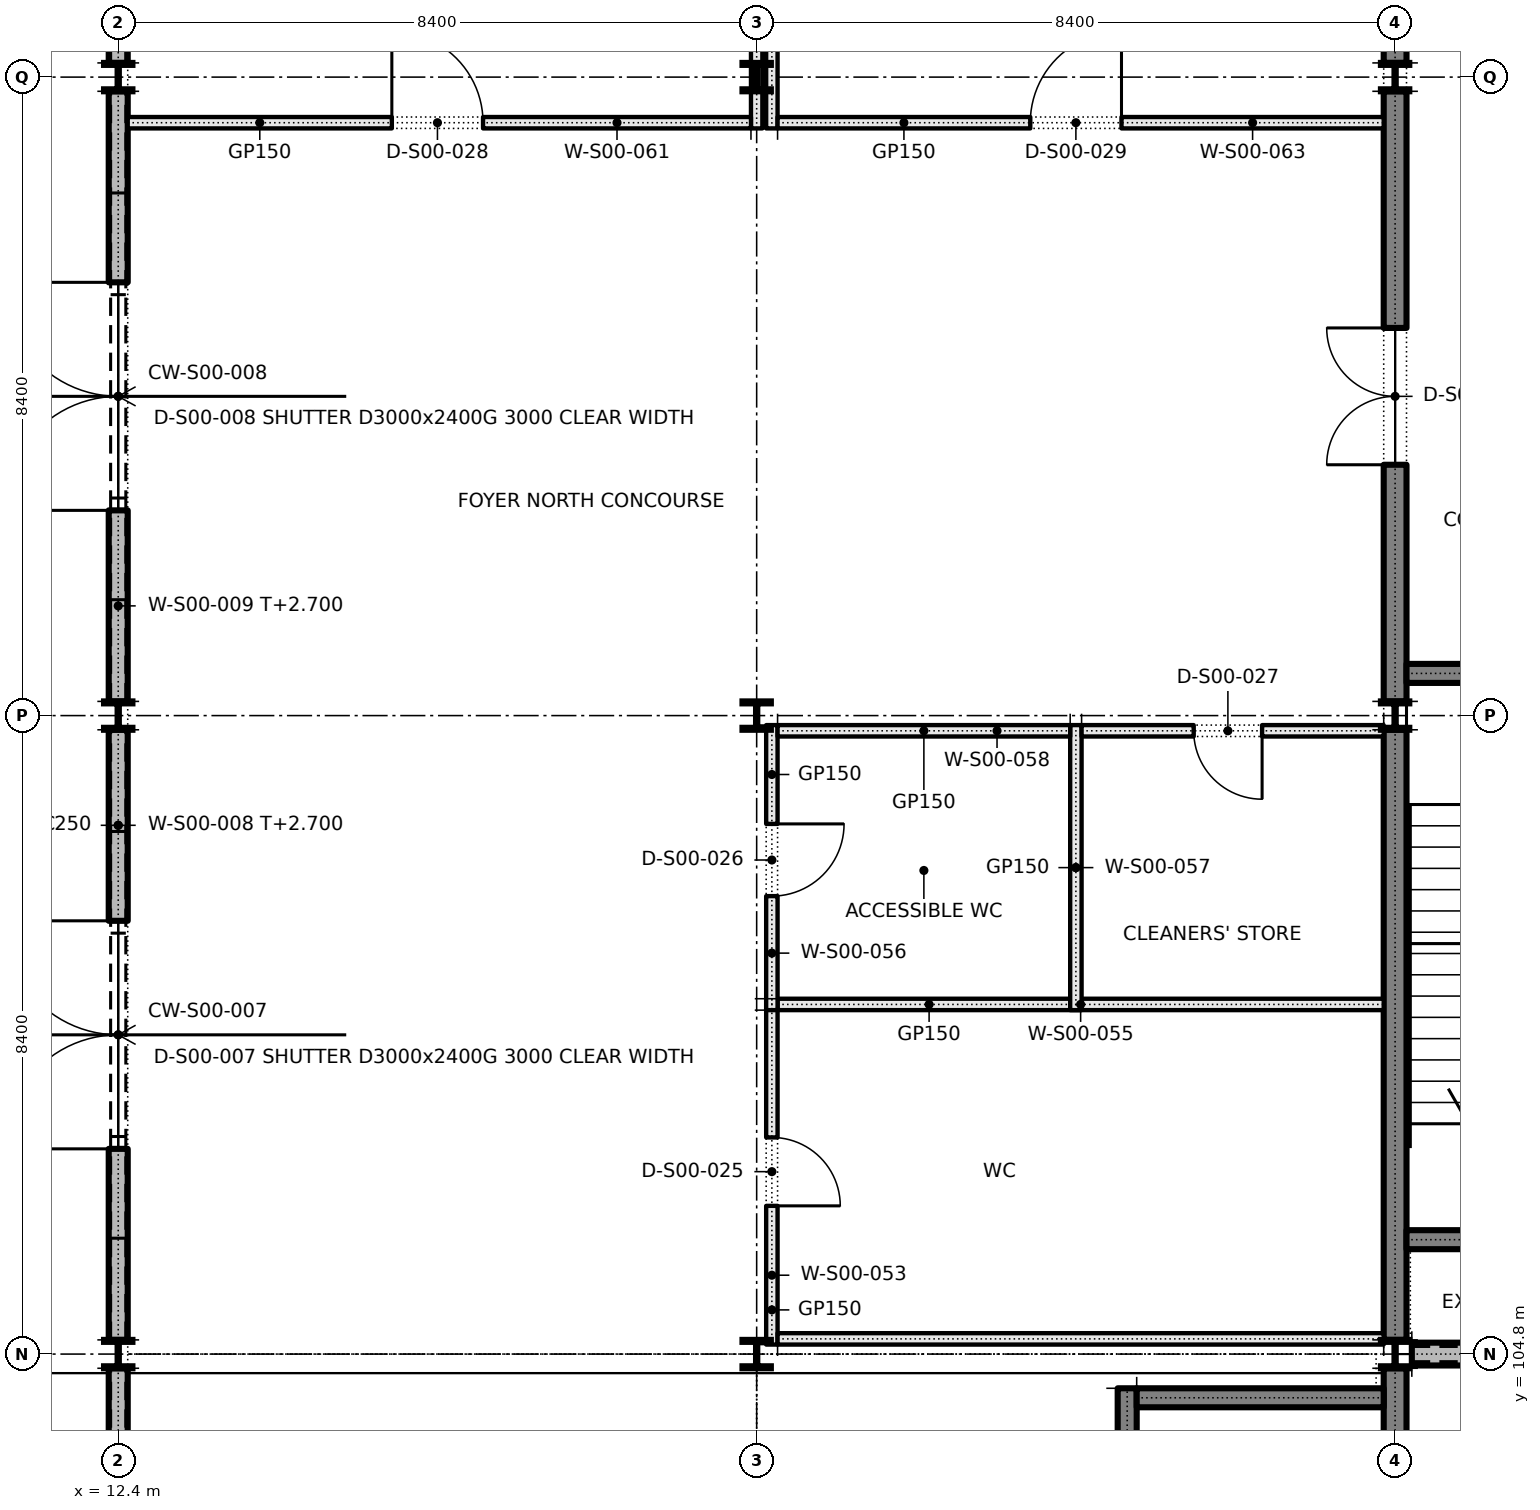
"""IFC4 building model, lengths in metres.
Left out: names, types, materials, properties, quantities, classifications, styles, units other than length and angle.
Written with IfcOpenShell. Run it as: python <this file> out.ifc"""

import sys

from ifc_helpers import new_model, si_unit, direction, frame, frame_2d, origin, origin_2d, place, context, subcontext, project, spatial, rectangle, i_section, extrude, element, fill, save


model = new_model("IFC4")
c1 = context("Model", 3, precision=1e-05, world=origin(), true_north=direction((0.0, 1.0)))
c2 = subcontext(c1, "Body", "Model", "MODEL_VIEW")
j1 = project(units=[si_unit("LENGTHUNIT", "METRE"), si_unit("PLANEANGLEUNIT", "RADIAN")], contexts=[c1])
p1 = place(None, origin())
s1 = spatial("IfcSite", under=j1, at=p1, CompositionType="ELEMENT")
p2 = place(p1, origin())
s2 = spatial("IfcBuilding", under=s1, at=p2, CompositionType="ELEMENT")
p3 = place(p2, origin())
s3 = spatial("IfcBuildingStorey", under=s2, at=p3, CompositionType="ELEMENT", Elevation=0.0)
for number, where, z_axis, x_axis in (
    (1, (12.4, 104.8, 0.0), (0.0, 0.0, 1.0), (1.0, 0.0, 0.0)),
    (2, (12.4, 113.2, 0.0), (0.0, 0.0, 1.0), (1.0, 0.0, 0.0)),
    (3, (12.4, 121.6, 0.0), (0.0, 0.0, 1.0), (1.0, 0.0, 0.0)),
    (4, (20.8, 104.8, 0.0), (0.0, 0.0, 1.0), (1.0, 0.0, 0.0)),
    (5, (20.8, 113.2, 0.0), (0.0, 0.0, 1.0), (1.0, 0.0, 0.0)),
    (6, (20.8, 121.6, 0.0), (0.0, 0.0, 1.0), (1.0, 0.0, 0.0)),
    (7, (29.2, 104.8, 0.0), (0.0, 0.0, 1.0), (1.0, 0.0, 0.0)),
    (8, (29.2, 113.2, 0.0), (0.0, 0.0, 1.0), (1.0, 0.0, 0.0)),
    (9, (29.2, 121.6, 0.0), (0.0, 0.0, 1.0), (1.0, 0.0, 0.0)),
):
    element("IfcColumn", number, at=place(p3, frame(where, z_axis=z_axis, x_axis=x_axis)), inside=s3, PredefinedType="COLUMN", context=c2, shape_type="SweptSolid", body=[
        extrude(i_section(OverallWidth=0.373, OverallDepth=0.373, WebThickness=0.016, FlangeThickness=0.026, FilletRadius=0.015, at=origin_2d()), origin(), (0.0, 0.0, 1.0), 5.4),
    ])
p4 = place(p3, frame((12.4, 96.587, 0.0), z_axis=(0.0, 0.0, 1.0), x_axis=(0.0, 1.0, 0.0)))
e10 = element("IfcWall", 10, at=p4, inside=s3, PredefinedType="SOLIDWALL", context=c2, shape_type="SweptSolid", body=[
    extrude(rectangle(XDim=8.027, YDim=0.25, at=frame_2d((4.013, 0.0))), origin(), (0.0, 0.0, 1.0), 2.7),
])
p5 = place(p4, frame((2.513, 0.0, 0.0)))
e11 = element("IfcOpeningElement", 11, at=p5, cuts=e10, PredefinedType="OPENING", context=c2, shape_type="SweptSolid", body=[
    extrude(rectangle(XDim=3.0, YDim=2.4, at=frame_2d((1.5, 1.2))), frame((0.0, 0.135, 0.0), z_axis=(0.0, -1.0, 0.0), x_axis=(1.0, 0.0, 0.0)), (0.0, 0.0, 1.0), 0.27),
])
p6 = place(p3, frame((12.4, 104.987, 0.0), z_axis=(0.0, 0.0, 1.0), x_axis=(0.0, 1.0, 0.0)))
e12 = element("IfcWall", 12, at=p6, inside=s3, PredefinedType="SOLIDWALL", context=c2, shape_type="SweptSolid", body=[
    extrude(rectangle(XDim=8.027, YDim=0.25, at=frame_2d((4.013, 0.0))), origin(), (0.0, 0.0, 1.0), 2.7),
])
p7 = place(p6, frame((2.513, 0.0, 0.0)))
e13 = element("IfcOpeningElement", 13, at=p7, cuts=e12, PredefinedType="OPENING", context=c2, shape_type="SweptSolid", body=[
    extrude(rectangle(XDim=3.0, YDim=2.4, at=frame_2d((1.5, 1.2))), frame((0.0, 0.135, 0.0), z_axis=(0.0, -1.0, 0.0), x_axis=(1.0, 0.0, 0.0)), (0.0, 0.0, 1.0), 0.27),
])
p8 = place(p3, frame((12.4, 113.387, 0.0), z_axis=(0.0, 0.0, 1.0), x_axis=(0.0, 1.0, 0.0)))
e14 = element("IfcWall", 14, at=p8, inside=s3, PredefinedType="SOLIDWALL", context=c2, shape_type="SweptSolid", body=[
    extrude(rectangle(XDim=8.027, YDim=0.25, at=frame_2d((4.013, 0.0))), origin(), (0.0, 0.0, 1.0), 2.7),
])
p9 = place(p8, frame((2.513, 0.0, 0.0)))
e15 = element("IfcOpeningElement", 15, at=p9, cuts=e14, PredefinedType="OPENING", context=c2, shape_type="SweptSolid", body=[
    extrude(rectangle(XDim=3.0, YDim=2.4, at=frame_2d((1.5, 1.2))), frame((0.0, 0.135, 0.0), z_axis=(0.0, -1.0, 0.0), x_axis=(1.0, 0.0, 0.0)), (0.0, 0.0, 1.0), 0.27),
])
p10 = place(p3, frame((12.4, 121.787, 0.0), z_axis=(0.0, 0.0, 1.0), x_axis=(0.0, 1.0, 0.0)))
e16 = element("IfcWall", 16, at=p10, inside=s3, PredefinedType="SOLIDWALL", context=c2, shape_type="SweptSolid", body=[
    extrude(rectangle(XDim=8.027, YDim=0.25, at=frame_2d((4.013, 0.0))), origin(), (0.0, 0.0, 1.0), 2.7),
])
p11 = place(p10, frame((2.513, 0.0, 0.0)))
e17 = element("IfcOpeningElement", 17, at=p11, cuts=e16, PredefinedType="OPENING", context=c2, shape_type="SweptSolid", body=[
    extrude(rectangle(XDim=3.0, YDim=2.4, at=frame_2d((1.5, 1.2))), frame((0.0, 0.135, 0.0), z_axis=(0.0, -1.0, 0.0), x_axis=(1.0, 0.0, 0.0)), (0.0, 0.0, 1.0), 0.27),
])
p12 = place(p3, frame((29.2, 96.65, 0.0), z_axis=(0.0, 0.0, 1.0), x_axis=(0.0, 1.0, 0.0)))
e18 = element("IfcWall", 18, at=p12, inside=s3, PredefinedType="SOLIDWALL", context=c2, shape_type="SweptSolid", body=[
    extrude(rectangle(XDim=7.963, YDim=0.3, at=frame_2d((3.982, 0.0))), origin(), (0.0, 0.0, 1.0), 5.4),
])
p13 = place(p12, frame((0.55, 0.0, 0.0)))
e19 = element("IfcOpeningElement", 19, at=p13, cuts=e18, PredefinedType="OPENING", context=c2, shape_type="SweptSolid", body=[
    extrude(rectangle(XDim=1.1, YDim=2.1, at=frame_2d((0.55, 1.05))), frame((0.0, 0.16, 0.0), z_axis=(0.0, -1.0, 0.0), x_axis=(1.0, 0.0, 0.0)), (0.0, 0.0, 1.0), 0.32),
])
p14 = place(p3, frame((29.2, 104.987, 0.0), z_axis=(0.0, 0.0, 1.0), x_axis=(0.0, 1.0, 0.0)))
e20 = element("IfcWall", 20, at=p14, inside=s3, PredefinedType="SOLIDWALL", context=c2, shape_type="SweptSolid", body=[
    extrude(rectangle(XDim=8.027, YDim=0.3, at=frame_2d((4.013, 0.0))), origin(), (0.0, 0.0, 1.0), 5.4),
])
p15 = place(p3, frame((29.2, 113.387, 0.0), z_axis=(0.0, 0.0, 1.0), x_axis=(0.0, 1.0, 0.0)))
e21 = element("IfcWall", 21, at=p15, inside=s3, PredefinedType="SOLIDWALL", context=c2, shape_type="SweptSolid", body=[
    extrude(rectangle(XDim=8.027, YDim=0.3, at=frame_2d((4.013, 0.0))), origin(), (0.0, 0.0, 1.0), 5.4),
])
p16 = place(p15, frame((3.113, 0.0, 0.0)))
e22 = element("IfcOpeningElement", 22, at=p16, cuts=e21, PredefinedType="OPENING", context=c2, shape_type="SweptSolid", body=[
    extrude(rectangle(XDim=1.8, YDim=2.4, at=frame_2d((0.9, 1.2))), frame((0.0, 0.16, 0.0), z_axis=(0.0, -1.0, 0.0), x_axis=(1.0, 0.0, 0.0)), (0.0, 0.0, 1.0), 0.32),
])
p17 = place(p3, frame((29.2, 121.787, 0.0), z_axis=(0.0, 0.0, 1.0), x_axis=(0.0, 1.0, 0.0)))
e23 = element("IfcWall", 23, at=p17, inside=s3, PredefinedType="SOLIDWALL", context=c2, shape_type="SweptSolid", body=[
    extrude(rectangle(XDim=8.027, YDim=0.3, at=frame_2d((4.013, 0.0))), origin(), (0.0, 0.0, 1.0), 5.4),
])
p18 = place(p3, frame((29.42, 104.8, 0.0), z_axis=(0.0, 0.0, 1.0), x_axis=(1.0, 0.0, 0.0)))
e24 = element("IfcWall", 24, at=p18, inside=s3, PredefinedType="SOLIDWALL", context=c2, shape_type="SweptSolid", body=[
    extrude(rectangle(XDim=3.98, YDim=0.3, at=frame_2d((1.99, 0.0))), origin(), (0.0, 0.0, 1.0), 2.7),
])
p19 = place(p18, frame((0.89, 0.0, 0.0)))
e25 = element("IfcOpeningElement", 25, at=p19, cuts=e24, PredefinedType="OPENING", context=c2, shape_type="SweptSolid", body=[
    extrude(rectangle(XDim=2.2, YDim=2.4, at=frame_2d((1.1, 1.2))), frame((0.0, 0.16, 0.0), z_axis=(0.0, -1.0, 0.0), x_axis=(1.0, 0.0, 0.0)), (0.0, 0.0, 1.0), 0.32),
])
p20 = place(p3, frame((25.675, 96.65, 0.0), z_axis=(0.0, 0.0, 1.0), x_axis=(0.0, 1.0, 0.0)))
e26 = element("IfcWall", 26, at=p20, inside=s3, PredefinedType="SHEAR", context=c2, shape_type="SweptSolid", body=[
    extrude(rectangle(XDim=7.7, YDim=0.25, at=frame_2d((3.85, 0.0))), origin(), (0.0, 0.0, 1.0), 5.4),
])
p21 = place(p20, frame((0.4, 0.0, 0.0)))
e27 = element("IfcOpeningElement", 27, at=p21, cuts=e26, PredefinedType="OPENING", context=c2, shape_type="SweptSolid", body=[
    extrude(rectangle(XDim=1.1, YDim=2.1, at=frame_2d((0.55, 1.05))), frame((0.0, 0.135, 0.0), z_axis=(0.0, -1.0, 0.0), x_axis=(1.0, 0.0, 0.0)), (0.0, 0.0, 1.0), 0.27),
])
p22 = place(p3, frame((25.8, 104.225, 0.0), z_axis=(0.0, 0.0, 1.0), x_axis=(1.0, 0.0, 0.0)))
e28 = element("IfcWall", 28, at=p22, inside=s3, PredefinedType="SHEAR", context=c2, shape_type="SweptSolid", body=[
    extrude(rectangle(XDim=3.25, YDim=0.25, at=frame_2d((1.625, 0.0))), origin(), (0.0, 0.0, 1.0), 5.4),
])
p23 = place(p3, frame((21.0, 104.925, 0.0), z_axis=(0.0, 0.0, 1.0), x_axis=(0.0, 1.0, 0.0)))
e29 = element("IfcWall", 29, at=p23, inside=s3, PredefinedType="PARTITIONING", context=c2, shape_type="SweptSolid", body=[
    extrude(rectangle(XDim=4.55, YDim=0.15, at=frame_2d((2.275, 0.0))), origin(), (0.0, 0.0, 1.0), 5.4),
])
p24 = place(p23, frame((1.825, 0.0, 0.0)))
e30 = element("IfcOpeningElement", 30, at=p24, cuts=e29, PredefinedType="OPENING", context=c2, shape_type="SweptSolid", body=[
    extrude(rectangle(XDim=0.9, YDim=2.1, at=frame_2d((0.45, 1.05))), frame((0.0, 0.085, 0.0), z_axis=(0.0, -1.0, 0.0), x_axis=(1.0, 0.0, 0.0)), (0.0, 0.0, 1.0), 0.17),
])
for number, where, z_axis, x_axis in (
    (31, (21.075, 105.0, 0.0), (0.0, 0.0, 1.0), (1.0, 0.0, 0.0)),
    (32, (21.075, 109.4, 0.0), (0.0, 0.0, 1.0), (1.0, 0.0, 0.0)),
):
    element("IfcWall", number, at=place(p3, frame(where, z_axis=z_axis, x_axis=x_axis)), inside=s3, PredefinedType="PARTITIONING", context=c2, shape_type="SweptSolid", body=[
        extrude(rectangle(XDim=7.975, YDim=0.15, at=frame_2d((3.988, 0.0))), origin(), (0.0, 0.0, 1.0), 5.4),
    ])
p25 = place(p3, frame((21.0, 109.325, 0.0), z_axis=(0.0, 0.0, 1.0), x_axis=(0.0, 1.0, 0.0)))
e33 = element("IfcWall", 33, at=p25, inside=s3, PredefinedType="PARTITIONING", context=c2, shape_type="SweptSolid", body=[
    extrude(rectangle(XDim=3.75, YDim=0.15, at=frame_2d((1.875, 0.0))), origin(), (0.0, 0.0, 1.0), 5.4),
])
p26 = place(p25, frame((1.5, 0.0, 0.0)))
e34 = element("IfcOpeningElement", 34, at=p26, cuts=e33, PredefinedType="OPENING", context=c2, shape_type="SweptSolid", body=[
    extrude(rectangle(XDim=0.95, YDim=2.1, at=frame_2d((0.475, 1.05))), frame((0.0, 0.085, 0.0), z_axis=(0.0, -1.0, 0.0), x_axis=(1.0, 0.0, 0.0)), (0.0, 0.0, 1.0), 0.17),
])
p27 = place(p3, frame((25.0, 109.325, 0.0), z_axis=(0.0, 0.0, 1.0), x_axis=(0.0, 1.0, 0.0)))
e35 = element("IfcWall", 35, at=p27, inside=s3, PredefinedType="PARTITIONING", context=c2, shape_type="SweptSolid", body=[
    extrude(rectangle(XDim=3.75, YDim=0.15, at=frame_2d((1.875, 0.0))), origin(), (0.0, 0.0, 1.0), 5.4),
])
p28 = place(p3, frame((21.075, 113.0, 0.0), z_axis=(0.0, 0.0, 1.0), x_axis=(1.0, 0.0, 0.0)))
e36 = element("IfcWall", 36, at=p28, inside=s3, PredefinedType="PARTITIONING", context=c2, shape_type="SweptSolid", body=[
    extrude(rectangle(XDim=3.85, YDim=0.15, at=frame_2d((1.925, 0.0))), origin(), (0.0, 0.0, 1.0), 5.4),
])
p29 = place(p3, frame((25.075, 113.0, 0.0), z_axis=(0.0, 0.0, 1.0), x_axis=(1.0, 0.0, 0.0)))
e37 = element("IfcWall", 37, at=p29, inside=s3, PredefinedType="PARTITIONING", context=c2, shape_type="SweptSolid", body=[
    extrude(rectangle(XDim=3.975, YDim=0.15, at=frame_2d((1.988, 0.0))), origin(), (0.0, 0.0, 1.0), 5.4),
])
p30 = place(p29, frame((1.475, 0.0, 0.0)))
e38 = element("IfcOpeningElement", 38, at=p30, cuts=e37, PredefinedType="OPENING", context=c2, shape_type="SweptSolid", body=[
    extrude(rectangle(XDim=0.9, YDim=2.1, at=frame_2d((0.45, 1.05))), frame((0.0, 0.085, 0.0), z_axis=(0.0, -1.0, 0.0), x_axis=(1.0, 0.0, 0.0)), (0.0, 0.0, 1.0), 0.17),
])
p31 = place(p3, frame((20.8, 120.925, 0.0), z_axis=(0.0, 0.0, 1.0), x_axis=(0.0, 1.0, 0.0)))
e39 = element("IfcWall", 39, at=p31, inside=s3, PredefinedType="PARTITIONING", context=c2, shape_type="SweptSolid", body=[
    extrude(rectangle(XDim=8.95, YDim=0.15, at=frame_2d((4.475, 0.0))), origin(), (0.0, 0.0, 1.0), 4.687),
])
p32 = place(p3, frame((12.525, 121.0, 0.0), z_axis=(0.0, 0.0, 1.0), x_axis=(1.0, 0.0, 0.0)))
e40 = element("IfcWall", 40, at=p32, inside=s3, PredefinedType="PARTITIONING", context=c2, shape_type="SweptSolid", body=[
    extrude(rectangle(XDim=8.2, YDim=0.15, at=frame_2d((4.1, 0.0))), origin(), (0.0, 0.0, 1.0), 5.4),
])
p33 = place(p32, frame((3.475, 0.0, 0.0)))
e41 = element("IfcOpeningElement", 41, at=p33, cuts=e40, PredefinedType="OPENING", context=c2, shape_type="SweptSolid", body=[
    extrude(rectangle(XDim=1.2, YDim=2.1, at=frame_2d((0.6, 1.05))), frame((0.0, 0.085, 0.0), z_axis=(0.0, -1.0, 0.0), x_axis=(1.0, 0.0, 0.0)), (0.0, 0.0, 1.0), 0.17),
])
p34 = place(p3, frame((21.0, 120.925, 0.0), z_axis=(0.0, 0.0, 1.0), x_axis=(0.0, 1.0, 0.0)))
e42 = element("IfcWall", 42, at=p34, inside=s3, PredefinedType="PARTITIONING", context=c2, shape_type="SweptSolid", body=[
    extrude(rectangle(XDim=8.95, YDim=0.15, at=frame_2d((4.475, 0.0))), origin(), (0.0, 0.0, 1.0), 5.4),
])
p35 = place(p3, frame((21.075, 121.0, 0.0), z_axis=(0.0, 0.0, 1.0), x_axis=(1.0, 0.0, 0.0)))
e43 = element("IfcWall", 43, at=p35, inside=s3, PredefinedType="PARTITIONING", context=c2, shape_type="SweptSolid", body=[
    extrude(rectangle(XDim=7.975, YDim=0.15, at=frame_2d((3.988, 0.0))), origin(), (0.0, 0.0, 1.0), 5.4),
])
p36 = place(p35, frame((3.325, 0.0, 0.0)))
e44 = element("IfcOpeningElement", 44, at=p36, cuts=e43, PredefinedType="OPENING", context=c2, shape_type="SweptSolid", body=[
    extrude(rectangle(XDim=1.2, YDim=2.1, at=frame_2d((0.6, 1.05))), frame((0.0, 0.085, 0.0), z_axis=(0.0, -1.0, 0.0), x_axis=(1.0, 0.0, 0.0)), (0.0, 0.0, 1.0), 0.17),
])
p37 = place(p3, frame((29.35, 113.755, 0.0), z_axis=(0.0, 0.0, 1.0), x_axis=(1.0, 0.0, 0.0)))
e45 = element("IfcWall", 45, at=p37, inside=s3, PredefinedType="SHEAR", context=c2, shape_type="SweptSolid", body=[
    extrude(rectangle(XDim=3.25, YDim=0.25, at=frame_2d((1.625, 0.0))), origin(), (0.0, 0.0, 1.0), 5.4),
])
p38 = place(p3, frame((29.35, 106.305, 0.0), z_axis=(0.0, 0.0, 1.0), x_axis=(1.0, 0.0, 0.0)))
e46 = element("IfcWall", 46, at=p38, inside=s3, PredefinedType="SHEAR", context=c2, shape_type="SweptSolid", body=[
    extrude(rectangle(XDim=3.25, YDim=0.25, at=frame_2d((1.625, 0.0))), origin(), (0.0, 0.0, 1.0), 5.4),
])
p39 = place(p38, frame((0.9, 0.0, 0.0)))
e47 = element("IfcOpeningElement", 47, at=p39, cuts=e46, PredefinedType="OPENING", context=c2, shape_type="SweptSolid", body=[
    extrude(rectangle(XDim=1.1, YDim=2.1, at=frame_2d((0.55, 1.05))), frame((0.0, 0.135, 0.0), z_axis=(0.0, -1.0, 0.0), x_axis=(1.0, 0.0, 0.0)), (0.0, 0.0, 1.0), 0.27),
])
p40 = place(p3, frame((29.2, 98.32, -0.2), z_axis=(0.0, 0.0, 1.0), x_axis=(0.0, 1.0, 0.0)))
e48 = element("IfcWall", 48, at=p40, inside=s3, PredefinedType="SOLIDWALL", context=c2, shape_type="SweptSolid", body=[
    extrude(rectangle(XDim=6.16, YDim=0.3, at=frame_2d((3.08, 0.0))), origin(), (0.0, 0.0, 1.0), 0.2),
])
p41 = place(p7, origin())
e49 = element("IfcDoor", 49, at=p41, inside=s3, OperationType="DOUBLE_DOOR_SINGLE_SWING", PredefinedType="DOOR", context=c2, shape_type="SweptSolid", body=[
    extrude(rectangle(XDim=3.0, YDim=2.4, at=frame_2d((1.5, 1.2))), frame((0.0, 0.025, 0.0), z_axis=(0.0, -1.0, 0.0), x_axis=(1.0, 0.0, 0.0)), (0.0, 0.0, 1.0), 0.05),
])
fill(e13, e49)
p42 = place(p9, origin())
e50 = element("IfcDoor", 50, at=p42, inside=s3, OperationType="DOUBLE_DOOR_SINGLE_SWING", PredefinedType="DOOR", context=c2, shape_type="SweptSolid", body=[
    extrude(rectangle(XDim=3.0, YDim=2.4, at=frame_2d((1.5, 1.2))), frame((0.0, 0.025, 0.0), z_axis=(0.0, -1.0, 0.0), x_axis=(1.0, 0.0, 0.0)), (0.0, 0.0, 1.0), 0.05),
])
fill(e15, e50)
p43 = place(p16, origin())
e51 = element("IfcDoor", 51, at=p43, inside=s3, OperationType="DOUBLE_DOOR_SINGLE_SWING", PredefinedType="DOOR", context=c2, shape_type="SweptSolid", body=[
    extrude(rectangle(XDim=1.8, YDim=2.4, at=frame_2d((0.9, 1.2))), frame((0.0, 0.025, 0.0), z_axis=(0.0, -1.0, 0.0), x_axis=(1.0, 0.0, 0.0)), (0.0, 0.0, 1.0), 0.05),
])
fill(e22, e51)
p44 = place(p24, frame((0.9, 0.0, 0.0), z_axis=(0.0, 0.0, 1.0), x_axis=(-1.0, 0.0, 0.0)))
e52 = element("IfcDoor", 52, at=p44, inside=s3, OperationType="SINGLE_SWING_RIGHT", PredefinedType="DOOR", context=c2, shape_type="SweptSolid", body=[
    extrude(rectangle(XDim=0.9, YDim=2.1, at=frame_2d((0.45, 1.05))), frame((0.0, 0.025, 0.0), z_axis=(0.0, -1.0, 0.0), x_axis=(1.0, 0.0, 0.0)), (0.0, 0.0, 1.0), 0.05),
])
fill(e30, e52)
p45 = place(p26, frame((0.95, 0.0, 0.0), z_axis=(0.0, 0.0, 1.0), x_axis=(-1.0, 0.0, 0.0)))
e53 = element("IfcDoor", 53, at=p45, inside=s3, OperationType="SINGLE_SWING_LEFT", PredefinedType="DOOR", context=c2, shape_type="SweptSolid", body=[
    extrude(rectangle(XDim=0.95, YDim=2.1, at=frame_2d((0.475, 1.05))), frame((0.0, 0.025, 0.0), z_axis=(0.0, -1.0, 0.0), x_axis=(1.0, 0.0, 0.0)), (0.0, 0.0, 1.0), 0.05),
])
fill(e34, e53)
p46 = place(p30, frame((0.9, 0.0, 0.0), z_axis=(0.0, 0.0, 1.0), x_axis=(-1.0, 0.0, 0.0)))
e54 = element("IfcDoor", 54, at=p46, inside=s3, OperationType="SINGLE_SWING_LEFT", PredefinedType="DOOR", context=c2, shape_type="SweptSolid", body=[
    extrude(rectangle(XDim=0.9, YDim=2.1, at=frame_2d((0.45, 1.05))), frame((0.0, 0.025, 0.0), z_axis=(0.0, -1.0, 0.0), x_axis=(1.0, 0.0, 0.0)), (0.0, 0.0, 1.0), 0.05),
])
fill(e38, e54)
p47 = place(p33, origin())
e55 = element("IfcDoor", 55, at=p47, inside=s3, OperationType="SINGLE_SWING_LEFT", PredefinedType="DOOR", context=c2, shape_type="SweptSolid", body=[
    extrude(rectangle(XDim=1.2, YDim=2.1, at=frame_2d((0.6, 1.05))), frame((0.0, 0.025, 0.0), z_axis=(0.0, -1.0, 0.0), x_axis=(1.0, 0.0, 0.0)), (0.0, 0.0, 1.0), 0.05),
])
fill(e41, e55)
p48 = place(p36, origin())
e56 = element("IfcDoor", 56, at=p48, inside=s3, OperationType="SINGLE_SWING_RIGHT", PredefinedType="DOOR", context=c2, shape_type="SweptSolid", body=[
    extrude(rectangle(XDim=1.2, YDim=2.1, at=frame_2d((0.6, 1.05))), frame((0.0, 0.025, 0.0), z_axis=(0.0, -1.0, 0.0), x_axis=(1.0, 0.0, 0.0)), (0.0, 0.0, 1.0), 0.05),
])
fill(e44, e56)
save(model, sys.argv[1])
